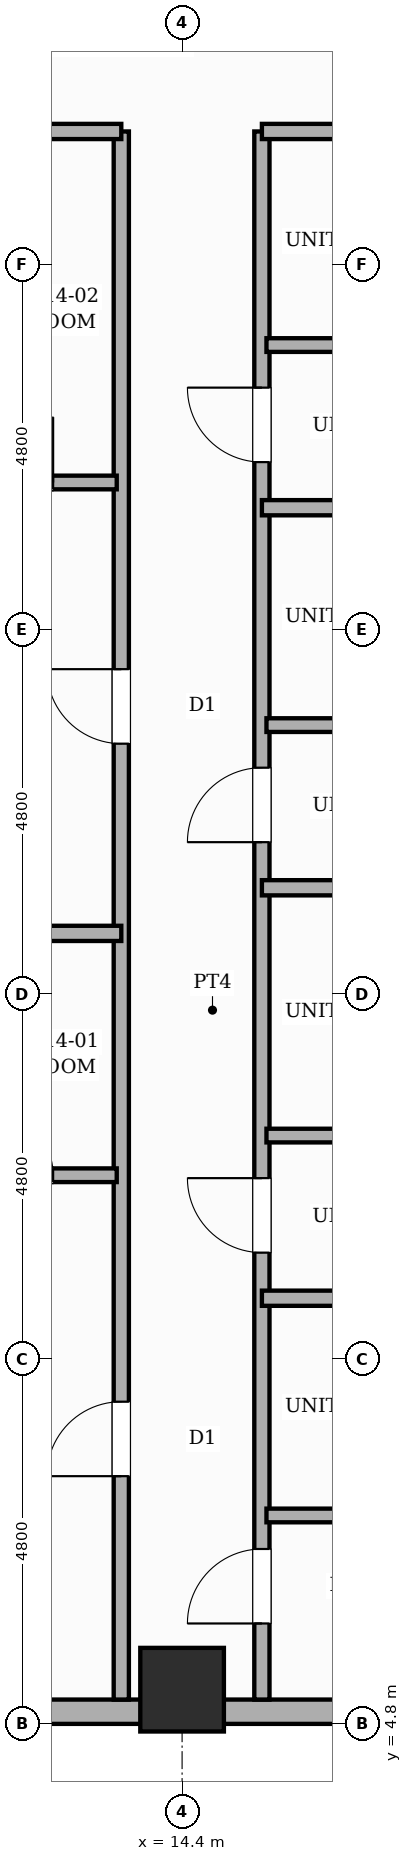
"""IFC4 building model, lengths in metres.
Left out: names, types, materials, properties, quantities, classifications, styles, units other than length and angle.
Written with IfcOpenShell. Run it as: python <this file> out.ifc"""

import sys

from ifc_helpers import new_model, si_unit, direction, frame, frame_2d, origin, origin_2d, place, context, subcontext, project, spatial, rectangle, extrude, element, fill, save


model = new_model("IFC4")
c1 = context("Model", 3, precision=1e-05, world=origin(), true_north=direction((0.0, 1.0)))
c2 = subcontext(c1, "Body", "Model", "MODEL_VIEW")
j1 = project(units=[si_unit("LENGTHUNIT", "METRE"), si_unit("PLANEANGLEUNIT", "RADIAN")], contexts=[c1])
p1 = place(None, origin())
s1 = spatial("IfcSite", under=j1, at=p1, CompositionType="ELEMENT")
p2 = place(p1, origin())
s2 = spatial("IfcBuilding", under=s1, at=p2, CompositionType="ELEMENT")
p3 = place(p2, frame((0.0, 0.0, 57.4)))
s3 = spatial("IfcBuildingStorey", under=s2, at=p3, CompositionType="ELEMENT", Elevation=57.4)
p4 = place(p3, frame((14.4, 5.25, 0.0), z_axis=(0.0, 0.0, 1.0), x_axis=(1.0, 0.0, 0.0)))
e1 = element("IfcColumn", 1, at=p4, inside=s3, PredefinedType="COLUMN", context=c2, shape_type="SweptSolid", body=[
    extrude(rectangle(XDim=1.1, YDim=1.1, at=origin_2d()), origin(), (0.0, 0.0, 1.0), 3.6),
])
p5 = place(p3, frame((21.6, 4.96, 0.0), z_axis=(0.0, 0.0, 1.0), x_axis=(-1.0, 0.0, 0.0)))
e2 = element("IfcWall", 2, at=p5, inside=s3, PredefinedType="STANDARD", context=c2, shape_type="SweptSolid", body=[
    extrude(rectangle(XDim=14.4, YDim=0.32, at=frame_2d((7.2, 0.0))), origin(), (0.0, 0.0, 1.0), 2.53),
])
p6 = place(p5, frame((0.47, 0.0, 0.45)))
e3 = element("IfcOpeningElement", 3, at=p6, cuts=e2, PredefinedType="OPENING", context=c2, shape_type="SweptSolid", body=[
    extrude(rectangle(XDim=0.95, YDim=1.8, at=frame_2d((0.475, 0.9))), frame((0.0, 0.17, 0.0), z_axis=(0.0, -1.0, 0.0), x_axis=(1.0, 0.0, 0.0)), (0.0, 0.0, 1.0), 0.34),
])
p7 = place(p5, frame((9.015, 0.0, 0.65)))
e4 = element("IfcOpeningElement", 4, at=p7, cuts=e2, PredefinedType="OPENING", context=c2, shape_type="SweptSolid", body=[
    extrude(rectangle(XDim=1.4, YDim=1.1, at=frame_2d((0.7, 0.55))), frame((0.0, 0.17, 0.0), z_axis=(0.0, -1.0, 0.0), x_axis=(1.0, 0.0, 0.0)), (0.0, 0.0, 1.0), 0.34),
])
p8 = place(p3, frame((13.6, 5.12, 0.0), z_axis=(0.0, 0.0, 1.0), x_axis=(0.0, 1.0, 0.0)))
e5 = element("IfcWall", 5, at=p8, inside=s3, PredefinedType="PARTITIONING", context=c2, shape_type="SweptSolid", body=[
    extrude(rectangle(XDim=20.63, YDim=0.2, at=frame_2d((10.315, 0.0))), origin(), (0.0, 0.0, 1.0), 3.35),
])
p9 = place(p8, frame((2.939, 0.0, 0.0)))
e6 = element("IfcOpeningElement", 6, at=p9, cuts=e5, PredefinedType="OPENING", context=c2, shape_type="SweptSolid", body=[
    extrude(rectangle(XDim=0.98, YDim=2.18, at=frame_2d((0.49, 1.09))), frame((0.0, 0.11, 0.0), z_axis=(0.0, -1.0, 0.0), x_axis=(1.0, 0.0, 0.0)), (0.0, 0.0, 1.0), 0.22),
])
p10 = place(p8, frame((12.576, 0.0, 0.0)))
e7 = element("IfcOpeningElement", 7, at=p10, cuts=e5, PredefinedType="OPENING", context=c2, shape_type="SweptSolid", body=[
    extrude(rectangle(XDim=0.98, YDim=2.18, at=frame_2d((0.49, 1.09))), frame((0.0, 0.11, 0.0), z_axis=(0.0, -1.0, 0.0), x_axis=(1.0, 0.0, 0.0)), (0.0, 0.0, 1.0), 0.22),
])
p11 = place(p3, frame((15.45, 5.12, 0.0), z_axis=(0.0, 0.0, 1.0), x_axis=(0.0, 1.0, 0.0)))
e8 = element("IfcWall", 8, at=p11, inside=s3, PredefinedType="PARTITIONING", context=c2, shape_type="SweptSolid", body=[
    extrude(rectangle(XDim=20.63, YDim=0.2, at=frame_2d((10.315, 0.0))), origin(), (0.0, 0.0, 1.0), 3.35),
])
p12 = place(p11, frame((1.001, 0.0, 0.0)))
e9 = element("IfcOpeningElement", 9, at=p12, cuts=e8, PredefinedType="OPENING", context=c2, shape_type="SweptSolid", body=[
    extrude(rectangle(XDim=0.98, YDim=2.18, at=frame_2d((0.49, 1.09))), frame((0.0, 0.11, 0.0), z_axis=(0.0, -1.0, 0.0), x_axis=(1.0, 0.0, 0.0)), (0.0, 0.0, 1.0), 0.22),
])
p13 = place(p11, frame((5.88, 0.0, 0.0)))
e10 = element("IfcOpeningElement", 10, at=p13, cuts=e8, PredefinedType="OPENING", context=c2, shape_type="SweptSolid", body=[
    extrude(rectangle(XDim=0.98, YDim=2.18, at=frame_2d((0.49, 1.09))), frame((0.0, 0.11, 0.0), z_axis=(0.0, -1.0, 0.0), x_axis=(1.0, 0.0, 0.0)), (0.0, 0.0, 1.0), 0.22),
])
p14 = place(p11, frame((11.28, 0.0, 0.0)))
e11 = element("IfcOpeningElement", 11, at=p14, cuts=e8, PredefinedType="OPENING", context=c2, shape_type="SweptSolid", body=[
    extrude(rectangle(XDim=0.98, YDim=2.18, at=frame_2d((0.49, 1.09))), frame((0.0, 0.11, 0.0), z_axis=(0.0, -1.0, 0.0), x_axis=(1.0, 0.0, 0.0)), (0.0, 0.0, 1.0), 0.22),
])
p15 = place(p11, frame((16.28, 0.0, 0.0)))
e12 = element("IfcOpeningElement", 12, at=p15, cuts=e8, PredefinedType="OPENING", context=c2, shape_type="SweptSolid", body=[
    extrude(rectangle(XDim=0.98, YDim=2.18, at=frame_2d((0.49, 1.09))), frame((0.0, 0.11, 0.0), z_axis=(0.0, -1.0, 0.0), x_axis=(1.0, 0.0, 0.0)), (0.0, 0.0, 1.0), 0.22),
])
p16 = place(p3, frame((5.12, 25.75, 0.0), z_axis=(0.0, 0.0, 1.0), x_axis=(1.0, 0.0, 0.0)))
e13 = element("IfcWall", 13, at=p16, inside=s3, PredefinedType="PARTITIONING", context=c2, shape_type="SweptSolid", body=[
    extrude(rectangle(XDim=8.48, YDim=0.2, at=frame_2d((4.24, 0.0))), origin(), (0.0, 0.0, 1.0), 3.35),
])
p17 = place(p3, frame((15.45, 25.75, 0.0), z_axis=(0.0, 0.0, 1.0), x_axis=(1.0, 0.0, 0.0)))
e14 = element("IfcWall", 14, at=p17, inside=s3, PredefinedType="PARTITIONING", context=c2, shape_type="SweptSolid", body=[
    extrude(rectangle(XDim=8.23, YDim=0.2, at=frame_2d((4.115, 0.0))), origin(), (0.0, 0.0, 1.0), 3.35),
])
p18 = place(p3, frame((5.12, 12.018, 0.0), z_axis=(0.0, 0.0, 1.0), x_axis=(1.0, 0.0, 0.0)))
e15 = element("IfcWall", 15, at=p18, inside=s3, PredefinedType="PLUMBINGWALL", context=c2, shape_type="SweptSolid", body=[
    extrude(rectangle(XDim=8.42, YDim=0.18, at=frame_2d((4.21, 0.0))), origin(), (0.0, 0.0, 1.0), 3.35),
])
p19 = place(p18, frame((1.046, 0.0, 0.0)))
e16 = element("IfcOpeningElement", 16, at=p19, cuts=e15, PredefinedType="OPENING", context=c2, shape_type="SweptSolid", body=[
    extrude(rectangle(XDim=0.9, YDim=2.15, at=frame_2d((0.45, 1.075))), frame((0.0, 0.1, 0.0), z_axis=(0.0, -1.0, 0.0), x_axis=(1.0, 0.0, 0.0)), (0.0, 0.0, 1.0), 0.2),
])
p20 = place(p18, frame((4.307, 0.0, 0.0)))
e17 = element("IfcOpeningElement", 17, at=p20, cuts=e15, PredefinedType="OPENING", context=c2, shape_type="SweptSolid", body=[
    extrude(rectangle(XDim=0.9, YDim=2.15, at=frame_2d((0.45, 1.075))), frame((0.0, 0.1, 0.0), z_axis=(0.0, -1.0, 0.0), x_axis=(1.0, 0.0, 0.0)), (0.0, 0.0, 1.0), 0.2),
])
p21 = place(p18, frame((6.723, 0.0, 0.0)))
e18 = element("IfcOpeningElement", 18, at=p21, cuts=e15, PredefinedType="OPENING", context=c2, shape_type="SweptSolid", body=[
    extrude(rectangle(XDim=0.86, YDim=2.1, at=frame_2d((0.43, 1.05))), frame((0.0, 0.1, 0.0), z_axis=(0.0, -1.0, 0.0), x_axis=(1.0, 0.0, 0.0)), (0.0, 0.0, 1.0), 0.2),
])
p22 = place(p3, frame((5.12, 15.2, 0.0), z_axis=(0.0, 0.0, 1.0), x_axis=(1.0, 0.0, 0.0)))
e19 = element("IfcWall", 19, at=p22, inside=s3, PredefinedType="SOLIDWALL", context=c2, shape_type="SweptSolid", body=[
    extrude(rectangle(XDim=8.48, YDim=0.2, at=frame_2d((4.24, 0.0))), origin(), (0.0, 0.0, 1.0), 3.35),
])
p23 = place(p3, frame((5.12, 21.132, 0.0), z_axis=(0.0, 0.0, 1.0), x_axis=(1.0, 0.0, 0.0)))
e20 = element("IfcWall", 20, at=p23, inside=s3, PredefinedType="PLUMBINGWALL", context=c2, shape_type="SweptSolid", body=[
    extrude(rectangle(XDim=8.42, YDim=0.18, at=frame_2d((4.21, 0.0))), origin(), (0.0, 0.0, 1.0), 3.35),
])
p24 = place(p23, frame((1.046, 0.0, 0.0)))
e21 = element("IfcOpeningElement", 21, at=p24, cuts=e20, PredefinedType="OPENING", context=c2, shape_type="SweptSolid", body=[
    extrude(rectangle(XDim=0.9, YDim=2.15, at=frame_2d((0.45, 1.075))), frame((0.0, 0.1, 0.0), z_axis=(0.0, -1.0, 0.0), x_axis=(1.0, 0.0, 0.0)), (0.0, 0.0, 1.0), 0.2),
])
p25 = place(p23, frame((4.307, 0.0, 0.0)))
e22 = element("IfcOpeningElement", 22, at=p25, cuts=e20, PredefinedType="OPENING", context=c2, shape_type="SweptSolid", body=[
    extrude(rectangle(XDim=0.9, YDim=2.15, at=frame_2d((0.45, 1.075))), frame((0.0, 0.1, 0.0), z_axis=(0.0, -1.0, 0.0), x_axis=(1.0, 0.0, 0.0)), (0.0, 0.0, 1.0), 0.2),
])
p26 = place(p23, frame((6.723, 0.0, 0.0)))
e23 = element("IfcOpeningElement", 23, at=p26, cuts=e20, PredefinedType="OPENING", context=c2, shape_type="SweptSolid", body=[
    extrude(rectangle(XDim=0.86, YDim=2.1, at=frame_2d((0.43, 1.05))), frame((0.0, 0.1, 0.0), z_axis=(0.0, -1.0, 0.0), x_axis=(1.0, 0.0, 0.0)), (0.0, 0.0, 1.0), 0.2),
])
p27 = place(p3, frame((15.51, 7.542, 0.0), z_axis=(0.0, 0.0, 1.0), x_axis=(1.0, 0.0, 0.0)))
e24 = element("IfcWall", 24, at=p27, inside=s3, PredefinedType="PLUMBINGWALL", context=c2, shape_type="SweptSolid", body=[
    extrude(rectangle(XDim=8.17, YDim=0.18, at=frame_2d((4.085, 0.0))), origin(), (0.0, 0.0, 1.0), 3.35),
])
p28 = place(p27, frame((1.565, 0.0, 0.0)))
e25 = element("IfcOpeningElement", 25, at=p28, cuts=e24, PredefinedType="OPENING", context=c2, shape_type="SweptSolid", body=[
    extrude(rectangle(XDim=0.86, YDim=2.1, at=frame_2d((0.43, 1.05))), frame((0.0, 0.1, 0.0), z_axis=(0.0, -1.0, 0.0), x_axis=(1.0, 0.0, 0.0)), (0.0, 0.0, 1.0), 0.2),
])
p29 = place(p27, frame((5.73, 0.0, 0.0)))
e26 = element("IfcOpeningElement", 26, at=p29, cuts=e24, PredefinedType="OPENING", context=c2, shape_type="SweptSolid", body=[
    extrude(rectangle(XDim=0.86, YDim=2.1, at=frame_2d((0.43, 1.05))), frame((0.0, 0.1, 0.0), z_axis=(0.0, -1.0, 0.0), x_axis=(1.0, 0.0, 0.0)), (0.0, 0.0, 1.0), 0.2),
])
p30 = place(p3, frame((15.45, 10.4, 0.0), z_axis=(0.0, 0.0, 1.0), x_axis=(1.0, 0.0, 0.0)))
e27 = element("IfcWall", 27, at=p30, inside=s3, PredefinedType="SOLIDWALL", context=c2, shape_type="SweptSolid", body=[
    extrude(rectangle(XDim=8.23, YDim=0.2, at=frame_2d((4.115, 0.0))), origin(), (0.0, 0.0, 1.0), 3.35),
])
p31 = place(p3, frame((15.51, 12.54, 0.0), z_axis=(0.0, 0.0, 1.0), x_axis=(1.0, 0.0, 0.0)))
e28 = element("IfcWall", 28, at=p31, inside=s3, PredefinedType="PLUMBINGWALL", context=c2, shape_type="SweptSolid", body=[
    extrude(rectangle(XDim=8.17, YDim=0.18, at=frame_2d((4.085, 0.0))), origin(), (0.0, 0.0, 1.0), 3.35),
])
p32 = place(p31, frame((1.565, 0.0, 0.0)))
e29 = element("IfcOpeningElement", 29, at=p32, cuts=e28, PredefinedType="OPENING", context=c2, shape_type="SweptSolid", body=[
    extrude(rectangle(XDim=0.86, YDim=2.1, at=frame_2d((0.43, 1.05))), frame((0.0, 0.1, 0.0), z_axis=(0.0, -1.0, 0.0), x_axis=(1.0, 0.0, 0.0)), (0.0, 0.0, 1.0), 0.2),
])
p33 = place(p31, frame((5.73, 0.0, 0.0)))
e30 = element("IfcOpeningElement", 30, at=p33, cuts=e28, PredefinedType="OPENING", context=c2, shape_type="SweptSolid", body=[
    extrude(rectangle(XDim=0.86, YDim=2.1, at=frame_2d((0.43, 1.05))), frame((0.0, 0.1, 0.0), z_axis=(0.0, -1.0, 0.0), x_axis=(1.0, 0.0, 0.0)), (0.0, 0.0, 1.0), 0.2),
])
p34 = place(p3, frame((15.45, 15.8, 0.0), z_axis=(0.0, 0.0, 1.0), x_axis=(1.0, 0.0, 0.0)))
e31 = element("IfcWall", 31, at=p34, inside=s3, PredefinedType="SOLIDWALL", context=c2, shape_type="SweptSolid", body=[
    extrude(rectangle(XDim=8.23, YDim=0.2, at=frame_2d((4.115, 0.0))), origin(), (0.0, 0.0, 1.0), 3.35),
])
p35 = place(p3, frame((15.51, 17.94, 0.0), z_axis=(0.0, 0.0, 1.0), x_axis=(1.0, 0.0, 0.0)))
e32 = element("IfcWall", 32, at=p35, inside=s3, PredefinedType="PLUMBINGWALL", context=c2, shape_type="SweptSolid", body=[
    extrude(rectangle(XDim=8.17, YDim=0.18, at=frame_2d((4.085, 0.0))), origin(), (0.0, 0.0, 1.0), 3.35),
])
p36 = place(p35, frame((1.565, 0.0, 0.0)))
e33 = element("IfcOpeningElement", 33, at=p36, cuts=e32, PredefinedType="OPENING", context=c2, shape_type="SweptSolid", body=[
    extrude(rectangle(XDim=0.86, YDim=2.1, at=frame_2d((0.43, 1.05))), frame((0.0, 0.1, 0.0), z_axis=(0.0, -1.0, 0.0), x_axis=(1.0, 0.0, 0.0)), (0.0, 0.0, 1.0), 0.2),
])
p37 = place(p35, frame((5.73, 0.0, 0.0)))
e34 = element("IfcOpeningElement", 34, at=p37, cuts=e32, PredefinedType="OPENING", context=c2, shape_type="SweptSolid", body=[
    extrude(rectangle(XDim=0.86, YDim=2.1, at=frame_2d((0.43, 1.05))), frame((0.0, 0.1, 0.0), z_axis=(0.0, -1.0, 0.0), x_axis=(1.0, 0.0, 0.0)), (0.0, 0.0, 1.0), 0.2),
])
p38 = place(p3, frame((15.45, 20.8, 0.0), z_axis=(0.0, 0.0, 1.0), x_axis=(1.0, 0.0, 0.0)))
e35 = element("IfcWall", 35, at=p38, inside=s3, PredefinedType="SOLIDWALL", context=c2, shape_type="SweptSolid", body=[
    extrude(rectangle(XDim=8.23, YDim=0.2, at=frame_2d((4.115, 0.0))), origin(), (0.0, 0.0, 1.0), 3.35),
])
p39 = place(p3, frame((15.51, 22.94, 0.0), z_axis=(0.0, 0.0, 1.0), x_axis=(1.0, 0.0, 0.0)))
e36 = element("IfcWall", 36, at=p39, inside=s3, PredefinedType="PLUMBINGWALL", context=c2, shape_type="SweptSolid", body=[
    extrude(rectangle(XDim=8.17, YDim=0.18, at=frame_2d((4.085, 0.0))), origin(), (0.0, 0.0, 1.0), 3.35),
])
p40 = place(p39, frame((1.565, 0.0, 0.0)))
e37 = element("IfcOpeningElement", 37, at=p40, cuts=e36, PredefinedType="OPENING", context=c2, shape_type="SweptSolid", body=[
    extrude(rectangle(XDim=0.86, YDim=2.1, at=frame_2d((0.43, 1.05))), frame((0.0, 0.1, 0.0), z_axis=(0.0, -1.0, 0.0), x_axis=(1.0, 0.0, 0.0)), (0.0, 0.0, 1.0), 0.2),
])
p41 = place(p39, frame((5.73, 0.0, 0.0)))
e38 = element("IfcOpeningElement", 38, at=p41, cuts=e36, PredefinedType="OPENING", context=c2, shape_type="SweptSolid", body=[
    extrude(rectangle(XDim=0.86, YDim=2.1, at=frame_2d((0.43, 1.05))), frame((0.0, 0.1, 0.0), z_axis=(0.0, -1.0, 0.0), x_axis=(1.0, 0.0, 0.0)), (0.0, 0.0, 1.0), 0.2),
])
p42 = place(p9, origin())
e39 = element("IfcDoor", 39, at=p42, inside=s3, OperationType="SINGLE_SWING_LEFT", PredefinedType="DOOR", context=c2, shape_type="SweptSolid", body=[
    extrude(rectangle(XDim=0.98, YDim=2.18, at=frame_2d((0.49, 1.09))), frame((0.0, 0.025, 0.0), z_axis=(0.0, -1.0, 0.0), x_axis=(1.0, 0.0, 0.0)), (0.0, 0.0, 1.0), 0.05),
])
fill(e6, e39)
p43 = place(p21, origin())
e40 = element("IfcDoor", 40, at=p43, inside=s3, OperationType="SINGLE_SWING_LEFT", PredefinedType="DOOR", context=c2, shape_type="SweptSolid", body=[
    extrude(rectangle(XDim=0.86, YDim=2.1, at=frame_2d((0.43, 1.05))), frame((0.0, 0.025, 0.0), z_axis=(0.0, -1.0, 0.0), x_axis=(1.0, 0.0, 0.0)), (0.0, 0.0, 1.0), 0.05),
])
fill(e18, e40)
p44 = place(p10, origin())
e41 = element("IfcDoor", 41, at=p44, inside=s3, OperationType="SINGLE_SWING_RIGHT", PredefinedType="DOOR", context=c2, shape_type="SweptSolid", body=[
    extrude(rectangle(XDim=0.98, YDim=2.18, at=frame_2d((0.49, 1.09))), frame((0.0, 0.025, 0.0), z_axis=(0.0, -1.0, 0.0), x_axis=(1.0, 0.0, 0.0)), (0.0, 0.0, 1.0), 0.05),
])
fill(e7, e41)
p45 = place(p26, origin())
e42 = element("IfcDoor", 42, at=p45, inside=s3, OperationType="SINGLE_SWING_RIGHT", PredefinedType="DOOR", context=c2, shape_type="SweptSolid", body=[
    extrude(rectangle(XDim=0.86, YDim=2.1, at=frame_2d((0.43, 1.05))), frame((0.0, 0.025, 0.0), z_axis=(0.0, -1.0, 0.0), x_axis=(1.0, 0.0, 0.0)), (0.0, 0.0, 1.0), 0.05),
])
fill(e23, e42)
p46 = place(p12, origin())
e43 = element("IfcDoor", 43, at=p46, inside=s3, OperationType="SINGLE_SWING_LEFT", PredefinedType="DOOR", context=c2, shape_type="SweptSolid", body=[
    extrude(rectangle(XDim=0.98, YDim=2.18, at=frame_2d((0.49, 1.09))), frame((0.0, 0.025, 0.0), z_axis=(0.0, -1.0, 0.0), x_axis=(1.0, 0.0, 0.0)), (0.0, 0.0, 1.0), 0.05),
])
fill(e9, e43)
p47 = place(p13, origin())
e44 = element("IfcDoor", 44, at=p47, inside=s3, OperationType="SINGLE_SWING_RIGHT", PredefinedType="DOOR", context=c2, shape_type="SweptSolid", body=[
    extrude(rectangle(XDim=0.98, YDim=2.18, at=frame_2d((0.49, 1.09))), frame((0.0, 0.025, 0.0), z_axis=(0.0, -1.0, 0.0), x_axis=(1.0, 0.0, 0.0)), (0.0, 0.0, 1.0), 0.05),
])
fill(e10, e44)
p48 = place(p14, origin())
e45 = element("IfcDoor", 45, at=p48, inside=s3, OperationType="SINGLE_SWING_LEFT", PredefinedType="DOOR", context=c2, shape_type="SweptSolid", body=[
    extrude(rectangle(XDim=0.98, YDim=2.18, at=frame_2d((0.49, 1.09))), frame((0.0, 0.025, 0.0), z_axis=(0.0, -1.0, 0.0), x_axis=(1.0, 0.0, 0.0)), (0.0, 0.0, 1.0), 0.05),
])
fill(e11, e45)
p49 = place(p15, origin())
e46 = element("IfcDoor", 46, at=p49, inside=s3, OperationType="SINGLE_SWING_RIGHT", PredefinedType="DOOR", context=c2, shape_type="SweptSolid", body=[
    extrude(rectangle(XDim=0.98, YDim=2.18, at=frame_2d((0.49, 1.09))), frame((0.0, 0.025, 0.0), z_axis=(0.0, -1.0, 0.0), x_axis=(1.0, 0.0, 0.0)), (0.0, 0.0, 1.0), 0.05),
])
fill(e12, e46)
save(model, sys.argv[1])
